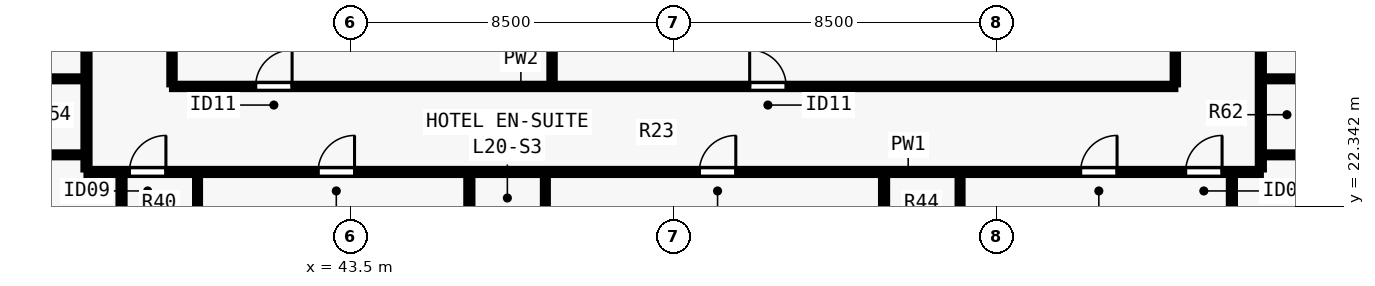
"""IFC4 building model, lengths in metres.
Left out: names, types, materials, properties, quantities, classifications, styles, units other than length and angle.
Written with IfcOpenShell. Run it as: python <this file> out.ifc"""

import sys

from ifc_helpers import new_model, si_unit, direction, frame, frame_2d, origin, place, context, subcontext, project, spatial, rectangle, extrude, element, fill, save


model = new_model("IFC4")
c1 = context("Model", 3, precision=1e-05, world=origin(), true_north=direction((0.0, 1.0)))
c2 = subcontext(c1, "Body", "Model", "MODEL_VIEW")
j1 = project(units=[si_unit("LENGTHUNIT", "METRE"), si_unit("PLANEANGLEUNIT", "RADIAN")], contexts=[c1])
p1 = place(None, origin())
s1 = spatial("IfcSite", under=j1, at=p1, CompositionType="ELEMENT")
p2 = place(p1, origin())
s2 = spatial("IfcBuilding", under=s1, at=p2, CompositionType="ELEMENT")
p3 = place(p2, frame((0.0, 0.0, 76.0)))
s3 = spatial("IfcBuildingStorey", under=s2, at=p3, CompositionType="ELEMENT", Elevation=76.0)
p4 = place(p3, frame((36.55, 23.25, 0.0), z_axis=(0.0, 0.0, 1.0), x_axis=(1.0, 0.0, 0.0)))
e1 = element("IfcWall", 1, at=p4, inside=s3, PredefinedType="PARTITIONING", context=c2, shape_type="SweptSolid", body=[
    extrude(rectangle(XDim=30.9, YDim=0.16, at=frame_2d((15.45, 0.0))), origin(), (0.0, 0.0, 1.0), 3.28),
])
p5 = place(p4, frame((1.13, 0.0, 0.0)))
e2 = element("IfcOpeningElement", 2, at=p5, cuts=e1, PredefinedType="OPENING", context=c2, shape_type="SweptSolid", body=[
    extrude(rectangle(XDim=0.96, YDim=2.15, at=frame_2d((0.48, 1.075))), frame((0.0, 0.09, 0.0), z_axis=(0.0, -1.0, 0.0), x_axis=(1.0, 0.0, 0.0)), (0.0, 0.0, 1.0), 0.18),
])
p6 = place(p4, frame((6.093, 0.0, 0.0)))
e3 = element("IfcOpeningElement", 3, at=p6, cuts=e1, PredefinedType="OPENING", context=c2, shape_type="SweptSolid", body=[
    extrude(rectangle(XDim=0.96, YDim=2.15, at=frame_2d((0.48, 1.075))), frame((0.0, 0.09, 0.0), z_axis=(0.0, -1.0, 0.0), x_axis=(1.0, 0.0, 0.0)), (0.0, 0.0, 1.0), 0.18),
])
p7 = place(p4, frame((16.125, 0.0, 0.0)))
e4 = element("IfcOpeningElement", 4, at=p7, cuts=e1, PredefinedType="OPENING", context=c2, shape_type="SweptSolid", body=[
    extrude(rectangle(XDim=0.96, YDim=2.15, at=frame_2d((0.48, 1.075))), frame((0.0, 0.09, 0.0), z_axis=(0.0, -1.0, 0.0), x_axis=(1.0, 0.0, 0.0)), (0.0, 0.0, 1.0), 0.18),
])
p8 = place(p4, frame((26.157, 0.0, 0.0)))
e5 = element("IfcOpeningElement", 5, at=p8, cuts=e1, PredefinedType="OPENING", context=c2, shape_type="SweptSolid", body=[
    extrude(rectangle(XDim=0.96, YDim=2.15, at=frame_2d((0.48, 1.075))), frame((0.0, 0.09, 0.0), z_axis=(0.0, -1.0, 0.0), x_axis=(1.0, 0.0, 0.0)), (0.0, 0.0, 1.0), 0.18),
])
p9 = place(p4, frame((28.92, 0.0, 0.0)))
e6 = element("IfcOpeningElement", 6, at=p9, cuts=e1, PredefinedType="OPENING", context=c2, shape_type="SweptSolid", body=[
    extrude(rectangle(XDim=0.96, YDim=2.15, at=frame_2d((0.48, 1.075))), frame((0.0, 0.09, 0.0), z_axis=(0.0, -1.0, 0.0), x_axis=(1.0, 0.0, 0.0)), (0.0, 0.0, 1.0), 0.18),
])
p10 = place(p3, frame((36.55, 23.315, 0.0), z_axis=(0.0, 0.0, 1.0), x_axis=(0.0, 1.0, 0.0)))
e7 = element("IfcWall", 7, at=p10, inside=s3, PredefinedType="PARTITIONING", context=c2, shape_type="SweptSolid", body=[
    extrude(rectangle(XDim=31.37, YDim=0.16, at=frame_2d((15.685, 0.0))), origin(), (0.0, 0.0, 1.0), 3.28),
])
p11 = place(p10, frame((4.848, 0.0, 0.0)))
e8 = element("IfcOpeningElement", 8, at=p11, cuts=e7, PredefinedType="OPENING", context=c2, shape_type="SweptSolid", body=[
    extrude(rectangle(XDim=0.96, YDim=2.15, at=frame_2d((0.48, 1.075))), frame((0.0, 0.09, 0.0), z_axis=(0.0, -1.0, 0.0), x_axis=(1.0, 0.0, 0.0)), (0.0, 0.0, 1.0), 0.18),
])
p12 = place(p10, frame((12.39, 0.0, 0.0)))
e9 = element("IfcOpeningElement", 9, at=p12, cuts=e7, PredefinedType="OPENING", context=c2, shape_type="SweptSolid", body=[
    extrude(rectangle(XDim=0.96, YDim=2.15, at=frame_2d((0.48, 1.075))), frame((0.0, 0.09, 0.0), z_axis=(0.0, -1.0, 0.0), x_axis=(1.0, 0.0, 0.0)), (0.0, 0.0, 1.0), 0.18),
])
p13 = place(p10, frame((20.265, 0.0, 0.0)))
e10 = element("IfcOpeningElement", 10, at=p13, cuts=e7, PredefinedType="OPENING", context=c2, shape_type="SweptSolid", body=[
    extrude(rectangle(XDim=0.96, YDim=2.15, at=frame_2d((0.48, 1.075))), frame((0.0, 0.09, 0.0), z_axis=(0.0, -1.0, 0.0), x_axis=(1.0, 0.0, 0.0)), (0.0, 0.0, 1.0), 0.18),
])
p14 = place(p10, frame((28.223, 0.0, 0.0)))
e11 = element("IfcOpeningElement", 11, at=p14, cuts=e7, PredefinedType="OPENING", context=c2, shape_type="SweptSolid", body=[
    extrude(rectangle(XDim=0.96, YDim=2.15, at=frame_2d((0.48, 1.075))), frame((0.0, 0.09, 0.0), z_axis=(0.0, -1.0, 0.0), x_axis=(1.0, 0.0, 0.0)), (0.0, 0.0, 1.0), 0.18),
])
p15 = place(p3, frame((67.45, 23.315, 0.0), z_axis=(0.0, 0.0, 1.0), x_axis=(0.0, 1.0, 0.0)))
e12 = element("IfcWall", 12, at=p15, inside=s3, PredefinedType="PARTITIONING", context=c2, shape_type="SweptSolid", body=[
    extrude(rectangle(XDim=31.37, YDim=0.16, at=frame_2d((15.685, 0.0))), origin(), (0.0, 0.0, 1.0), 3.28),
])
p16 = place(p15, frame((8.474, 0.0, 0.0)))
e13 = element("IfcOpeningElement", 13, at=p16, cuts=e12, PredefinedType="OPENING", context=c2, shape_type="SweptSolid", body=[
    extrude(rectangle(XDim=0.96, YDim=2.15, at=frame_2d((0.48, 1.075))), frame((0.0, 0.09, 0.0), z_axis=(0.0, -1.0, 0.0), x_axis=(1.0, 0.0, 0.0)), (0.0, 0.0, 1.0), 0.18),
])
p17 = place(p15, frame((23.974, 0.0, 0.0)))
e14 = element("IfcOpeningElement", 14, at=p17, cuts=e12, PredefinedType="OPENING", context=c2, shape_type="SweptSolid", body=[
    extrude(rectangle(XDim=0.96, YDim=2.15, at=frame_2d((0.48, 1.075))), frame((0.0, 0.09, 0.0), z_axis=(0.0, -1.0, 0.0), x_axis=(1.0, 0.0, 0.0)), (0.0, 0.0, 1.0), 0.18),
])
p18 = place(p3, frame((38.8, 25.5, 0.0), z_axis=(0.0, 0.0, 1.0), x_axis=(1.0, 0.0, 0.0)))
e15 = element("IfcWall", 15, at=p18, inside=s3, PredefinedType="PARTITIONING", context=c2, shape_type="SweptSolid", body=[
    extrude(rectangle(XDim=26.4, YDim=0.14, at=frame_2d((13.2, 0.0))), origin(), (0.0, 0.0, 1.0), 3.28),
])
p19 = place(p18, frame((2.2, 0.0, 0.0)))
e16 = element("IfcOpeningElement", 16, at=p19, cuts=e15, PredefinedType="OPENING", context=c2, shape_type="SweptSolid", body=[
    extrude(rectangle(XDim=0.96, YDim=2.12, at=frame_2d((0.48, 1.06))), frame((0.0, 0.08, 0.0), z_axis=(0.0, -1.0, 0.0), x_axis=(1.0, 0.0, 0.0)), (0.0, 0.0, 1.0), 0.16),
])
p20 = place(p18, frame((15.2, 0.0, 0.0)))
e17 = element("IfcOpeningElement", 17, at=p20, cuts=e15, PredefinedType="OPENING", context=c2, shape_type="SweptSolid", body=[
    extrude(rectangle(XDim=0.96, YDim=2.12, at=frame_2d((0.48, 1.06))), frame((0.0, 0.08, 0.0), z_axis=(0.0, -1.0, 0.0), x_axis=(1.0, 0.0, 0.0)), (0.0, 0.0, 1.0), 0.16),
])
p21 = place(p3, frame((38.8, 25.555, 0.0), z_axis=(0.0, 0.0, 1.0), x_axis=(0.0, 1.0, 0.0)))
e18 = element("IfcWall", 18, at=p21, inside=s3, PredefinedType="PARTITIONING", context=c2, shape_type="SweptSolid", body=[
    extrude(rectangle(XDim=13.195, YDim=0.14, at=frame_2d((6.598, 0.0))), origin(), (0.0, 0.0, 1.0), 3.28),
])
p22 = place(p21, frame((1.045, 0.0, 0.0)))
e19 = element("IfcOpeningElement", 19, at=p22, cuts=e18, PredefinedType="OPENING", context=c2, shape_type="SweptSolid", body=[
    extrude(rectangle(XDim=0.88, YDim=2.1, at=frame_2d((0.44, 1.05))), frame((0.0, 0.08, 0.0), z_axis=(0.0, -1.0, 0.0), x_axis=(1.0, 0.0, 0.0)), (0.0, 0.0, 1.0), 0.16),
])
p23 = place(p21, frame((10.245, 0.0, 0.0)))
e20 = element("IfcOpeningElement", 20, at=p23, cuts=e18, PredefinedType="OPENING", context=c2, shape_type="SweptSolid", body=[
    extrude(rectangle(XDim=0.88, YDim=2.1, at=frame_2d((0.44, 1.05))), frame((0.0, 0.08, 0.0), z_axis=(0.0, -1.0, 0.0), x_axis=(1.0, 0.0, 0.0)), (0.0, 0.0, 1.0), 0.16),
])
p24 = place(p3, frame((65.2, 25.555, 0.0), z_axis=(0.0, 0.0, 1.0), x_axis=(0.0, 1.0, 0.0)))
e21 = element("IfcWall", 21, at=p24, inside=s3, PredefinedType="PARTITIONING", context=c2, shape_type="SweptSolid", body=[
    extrude(rectangle(XDim=13.195, YDim=0.14, at=frame_2d((6.598, 0.0))), origin(), (0.0, 0.0, 1.0), 3.28),
])
p25 = place(p24, frame((2.445, 0.0, 0.0)))
e22 = element("IfcOpeningElement", 22, at=p25, cuts=e21, PredefinedType="OPENING", context=c2, shape_type="SweptSolid", body=[
    extrude(rectangle(XDim=0.88, YDim=2.1, at=frame_2d((0.44, 1.05))), frame((0.0, 0.08, 0.0), z_axis=(0.0, -1.0, 0.0), x_axis=(1.0, 0.0, 0.0)), (0.0, 0.0, 1.0), 0.16),
])
p26 = place(p3, frame((48.8, 25.555, 0.0), z_axis=(0.0, 0.0, 1.0), x_axis=(0.0, 1.0, 0.0)))
e23 = element("IfcWall", 23, at=p26, inside=s3, PredefinedType="PARTITIONING", context=c2, shape_type="SweptSolid", body=[
    extrude(rectangle(XDim=4.685, YDim=0.14, at=frame_2d((2.343, 0.0))), origin(), (0.0, 0.0, 1.0), 3.28),
])
p27 = place(p3, frame((37.472, 13.845, 0.0), z_axis=(0.0, 0.0, 1.0), x_axis=(0.0, 1.0, 0.0)))
e24 = element("IfcWall", 24, at=p27, inside=s3, PredefinedType="PARTITIONING", context=c2, shape_type="SweptSolid", body=[
    extrude(rectangle(XDim=9.34, YDim=0.16, at=frame_2d((4.67, 0.0))), origin(), (0.0, 0.0, 1.0), 3.28),
])
p28 = place(p3, frame((39.472, 20.95, 0.0), z_axis=(0.0, 0.0, 1.0), x_axis=(0.0, 1.0, 0.0)))
e25 = element("IfcWall", 25, at=p28, inside=s3, PredefinedType="PLUMBINGWALL", context=c2, shape_type="SweptSolid", body=[
    extrude(rectangle(XDim=2.235, YDim=0.13, at=frame_2d((1.118, 0.0))), origin(), (0.0, 0.0, 1.0), 3.28),
])
p29 = place(p3, frame((46.624, 13.845, 0.0), z_axis=(0.0, 0.0, 1.0), x_axis=(0.0, 1.0, 0.0)))
e26 = element("IfcWall", 26, at=p29, inside=s3, PredefinedType="PARTITIONING", context=c2, shape_type="SweptSolid", body=[
    extrude(rectangle(XDim=9.34, YDim=0.16, at=frame_2d((4.67, 0.0))), origin(), (0.0, 0.0, 1.0), 3.28),
])
p30 = place(p3, frame((48.624, 20.95, 0.0), z_axis=(0.0, 0.0, 1.0), x_axis=(0.0, 1.0, 0.0)))
e27 = element("IfcWall", 27, at=p30, inside=s3, PredefinedType="PLUMBINGWALL", context=c2, shape_type="SweptSolid", body=[
    extrude(rectangle(XDim=2.235, YDim=0.13, at=frame_2d((1.118, 0.0))), origin(), (0.0, 0.0, 1.0), 3.28),
])
p31 = place(p3, frame((57.536, 13.845, 0.0), z_axis=(0.0, 0.0, 1.0), x_axis=(0.0, 1.0, 0.0)))
e28 = element("IfcWall", 28, at=p31, inside=s3, PredefinedType="PARTITIONING", context=c2, shape_type="SweptSolid", body=[
    extrude(rectangle(XDim=9.34, YDim=0.16, at=frame_2d((4.67, 0.0))), origin(), (0.0, 0.0, 1.0), 3.28),
])
p32 = place(p3, frame((59.536, 20.95, 0.0), z_axis=(0.0, 0.0, 1.0), x_axis=(0.0, 1.0, 0.0)))
e29 = element("IfcWall", 29, at=p32, inside=s3, PredefinedType="PLUMBINGWALL", context=c2, shape_type="SweptSolid", body=[
    extrude(rectangle(XDim=2.235, YDim=0.13, at=frame_2d((1.118, 0.0))), origin(), (0.0, 0.0, 1.0), 3.28),
])
p33 = place(p3, frame((66.688, 13.845, 0.0), z_axis=(0.0, 0.0, 1.0), x_axis=(0.0, 1.0, 0.0)))
e30 = element("IfcWall", 30, at=p33, inside=s3, PredefinedType="PARTITIONING", context=c2, shape_type="SweptSolid", body=[
    extrude(rectangle(XDim=9.34, YDim=0.16, at=frame_2d((4.67, 0.0))), origin(), (0.0, 0.0, 1.0), 2.439),
])
p34 = place(p3, frame((34.25, 23.7, 0.0), z_axis=(0.0, 0.0, 1.0), x_axis=(1.0, 0.0, 0.0)))
e31 = element("IfcWall", 31, at=p34, inside=s3, PredefinedType="PLUMBINGWALL", context=c2, shape_type="SweptSolid", body=[
    extrude(rectangle(XDim=2.235, YDim=0.13, at=frame_2d((1.118, 0.0))), origin(), (0.0, 0.0, 1.0), 2.849),
])
p35 = place(p3, frame((34.25, 25.7, 0.0), z_axis=(0.0, 0.0, 1.0), x_axis=(1.0, 0.0, 0.0)))
e32 = element("IfcWall", 32, at=p35, inside=s3, PredefinedType="PLUMBINGWALL", context=c2, shape_type="SweptSolid", body=[
    extrude(rectangle(XDim=2.235, YDim=0.13, at=frame_2d((1.118, 0.0))), origin(), (0.0, 0.0, 1.0), 3.28),
])
p36 = place(p3, frame((67.515, 23.7, 0.0), z_axis=(0.0, 0.0, 1.0), x_axis=(1.0, 0.0, 0.0)))
e33 = element("IfcWall", 33, at=p36, inside=s3, PredefinedType="PLUMBINGWALL", context=c2, shape_type="SweptSolid", body=[
    extrude(rectangle(XDim=2.235, YDim=0.13, at=frame_2d((1.118, 0.0))), origin(), (0.0, 0.0, 1.0), 2.849),
])
p37 = place(p3, frame((67.515, 25.7, 0.0), z_axis=(0.0, 0.0, 1.0), x_axis=(1.0, 0.0, 0.0)))
e34 = element("IfcWall", 34, at=p37, inside=s3, PredefinedType="PLUMBINGWALL", context=c2, shape_type="SweptSolid", body=[
    extrude(rectangle(XDim=2.235, YDim=0.13, at=frame_2d((1.118, 0.0))), origin(), (0.0, 0.0, 1.0), 3.28),
])
p38 = place(p19, origin())
e35 = element("IfcDoor", 35, at=p38, inside=s3, OperationType="SINGLE_SWING_RIGHT", PredefinedType="DOOR", context=c2, shape_type="SweptSolid", body=[
    extrude(rectangle(XDim=0.96, YDim=2.12, at=frame_2d((0.48, 1.06))), frame((0.0, 0.025, 0.0), z_axis=(0.0, -1.0, 0.0), x_axis=(1.0, 0.0, 0.0)), (0.0, 0.0, 1.0), 0.05),
])
fill(e16, e35)
p39 = place(p20, origin())
e36 = element("IfcDoor", 36, at=p39, inside=s3, OperationType="SINGLE_SWING_LEFT", PredefinedType="DOOR", context=c2, shape_type="SweptSolid", body=[
    extrude(rectangle(XDim=0.96, YDim=2.12, at=frame_2d((0.48, 1.06))), frame((0.0, 0.025, 0.0), z_axis=(0.0, -1.0, 0.0), x_axis=(1.0, 0.0, 0.0)), (0.0, 0.0, 1.0), 0.05),
])
fill(e17, e36)
p40 = place(p5, origin())
e37 = element("IfcDoor", 37, at=p40, inside=s3, OperationType="SINGLE_SWING_RIGHT", PredefinedType="DOOR", context=c2, shape_type="SweptSolid", body=[
    extrude(rectangle(XDim=0.96, YDim=2.15, at=frame_2d((0.48, 1.075))), frame((0.0, 0.025, 0.0), z_axis=(0.0, -1.0, 0.0), x_axis=(1.0, 0.0, 0.0)), (0.0, 0.0, 1.0), 0.05),
])
fill(e2, e37)
p41 = place(p6, origin())
e38 = element("IfcDoor", 38, at=p41, inside=s3, OperationType="SINGLE_SWING_RIGHT", PredefinedType="DOOR", context=c2, shape_type="SweptSolid", body=[
    extrude(rectangle(XDim=0.96, YDim=2.15, at=frame_2d((0.48, 1.075))), frame((0.0, 0.025, 0.0), z_axis=(0.0, -1.0, 0.0), x_axis=(1.0, 0.0, 0.0)), (0.0, 0.0, 1.0), 0.05),
])
fill(e3, e38)
p42 = place(p7, origin())
e39 = element("IfcDoor", 39, at=p42, inside=s3, OperationType="SINGLE_SWING_RIGHT", PredefinedType="DOOR", context=c2, shape_type="SweptSolid", body=[
    extrude(rectangle(XDim=0.96, YDim=2.15, at=frame_2d((0.48, 1.075))), frame((0.0, 0.025, 0.0), z_axis=(0.0, -1.0, 0.0), x_axis=(1.0, 0.0, 0.0)), (0.0, 0.0, 1.0), 0.05),
])
fill(e4, e39)
p43 = place(p8, origin())
e40 = element("IfcDoor", 40, at=p43, inside=s3, OperationType="SINGLE_SWING_RIGHT", PredefinedType="DOOR", context=c2, shape_type="SweptSolid", body=[
    extrude(rectangle(XDim=0.96, YDim=2.15, at=frame_2d((0.48, 1.075))), frame((0.0, 0.025, 0.0), z_axis=(0.0, -1.0, 0.0), x_axis=(1.0, 0.0, 0.0)), (0.0, 0.0, 1.0), 0.05),
])
fill(e5, e40)
p44 = place(p9, origin())
e41 = element("IfcDoor", 41, at=p44, inside=s3, OperationType="SINGLE_SWING_RIGHT", PredefinedType="DOOR", context=c2, shape_type="SweptSolid", body=[
    extrude(rectangle(XDim=0.96, YDim=2.15, at=frame_2d((0.48, 1.075))), frame((0.0, 0.025, 0.0), z_axis=(0.0, -1.0, 0.0), x_axis=(1.0, 0.0, 0.0)), (0.0, 0.0, 1.0), 0.05),
])
fill(e6, e41)
save(model, sys.argv[1])
